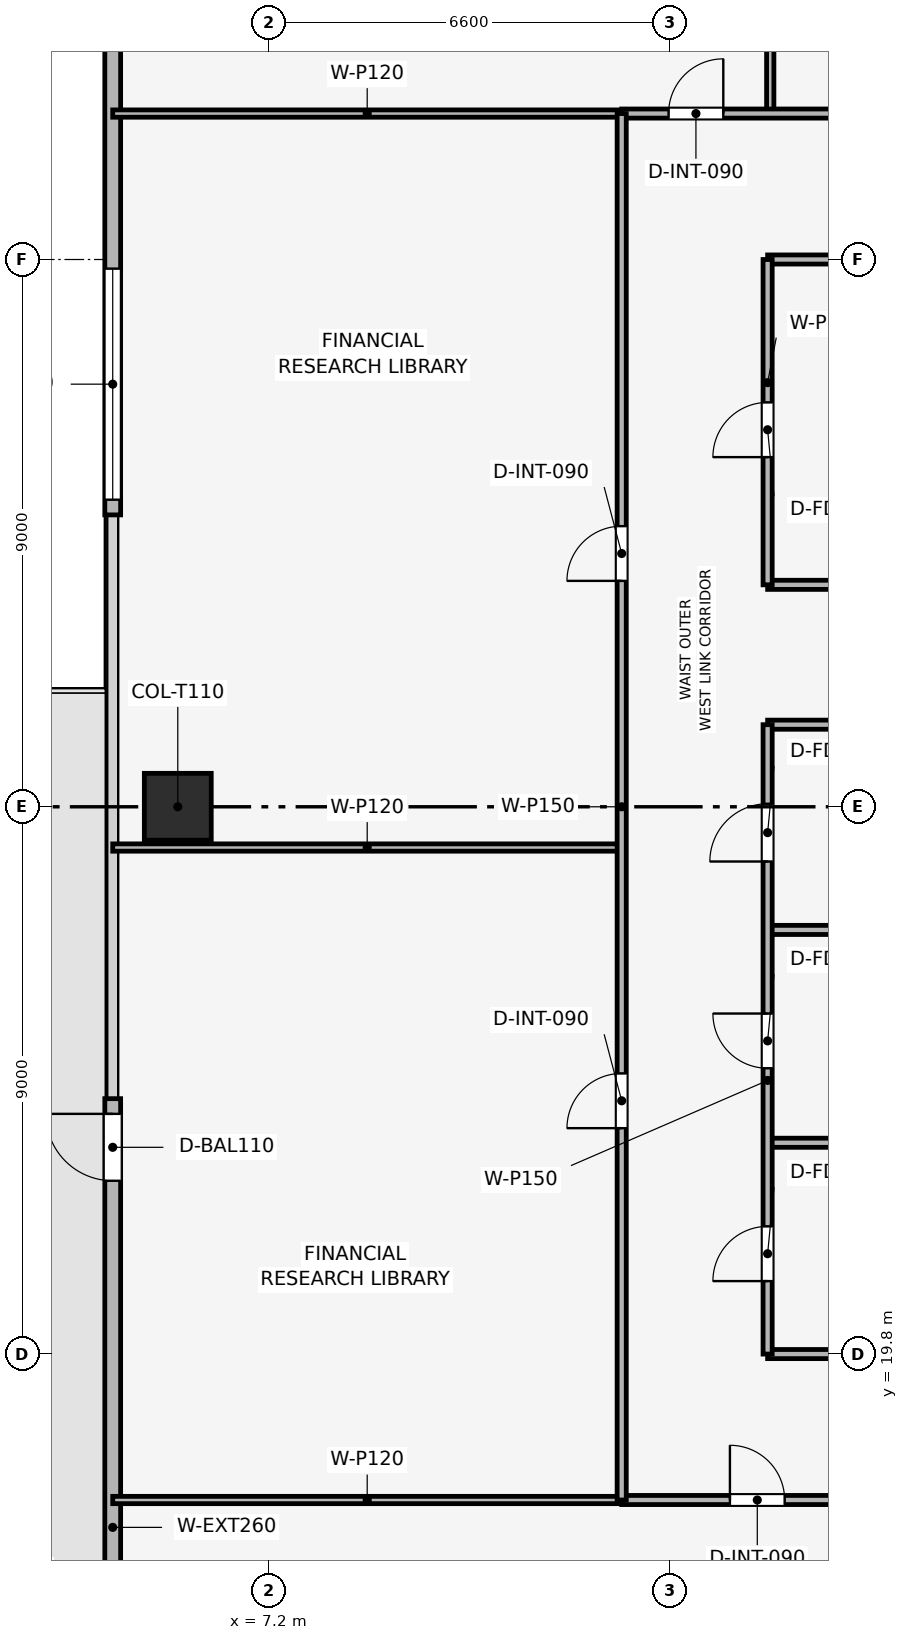
"""IFC4 building model, lengths in metres.
Left out: names, types, materials, properties, quantities, classifications, styles, units other than length and angle.
Written with IfcOpenShell. Run it as: python <this file> out.ifc"""

import sys

from ifc_helpers import new_model, si_unit, direction, frame, frame_2d, origin, origin_2d, place, context, subcontext, project, spatial, rectangle, extrude, element, fill, save


model = new_model("IFC4")
c1 = context("Model", 3, precision=1e-05, world=origin(), true_north=direction((0.0, 1.0)))
c2 = subcontext(c1, "Body", "Model", "MODEL_VIEW")
j1 = project(units=[si_unit("LENGTHUNIT", "METRE"), si_unit("PLANEANGLEUNIT", "RADIAN")], contexts=[c1])
p1 = place(None, origin())
s1 = spatial("IfcSite", under=j1, at=p1, CompositionType="ELEMENT")
p2 = place(p1, origin())
s2 = spatial("IfcBuilding", under=s1, at=p2, CompositionType="ELEMENT")
p3 = place(p2, frame((0.0, 0.0, 164.55)))
s3 = spatial("IfcBuildingStorey", under=s2, at=p3, CompositionType="ELEMENT", Elevation=164.55)
p4 = place(p3, frame((5.7, 28.8, 0.003), z_axis=(0.0, 0.0, 1.0), x_axis=(1.0, 0.0, 0.0)))
e1 = element("IfcColumn", 1, at=p4, inside=s3, PredefinedType="COLUMN", context=c2, shape_type="SweptSolid", body=[
    extrude(rectangle(XDim=1.1, YDim=1.1, at=origin_2d()), origin(), (0.0, 0.0, 1.0), 3.489),
])
p5 = place(p3, frame((4.63, 11.4, 0.0), z_axis=(0.0, 0.0, 1.0), x_axis=(0.0, 1.0, 0.0)))
e2 = element("IfcWall", 2, at=p5, inside=s3, PredefinedType="SOLIDWALL", context=c2, shape_type="SweptSolid", body=[
    extrude(rectangle(XDim=12.6, YDim=0.26, at=frame_2d((6.3, 0.0))), origin(), (0.0, 0.0, 1.0), 3.495),
])
p6 = place(p5, frame((11.25, 0.0, 0.0)))
e3 = element("IfcOpeningElement", 3, at=p6, cuts=e2, PredefinedType="OPENING", context=c2, shape_type="SweptSolid", body=[
    extrude(rectangle(XDim=1.1, YDim=2.2, at=frame_2d((0.55, 1.1))), frame((0.0, 0.14, 0.0), z_axis=(0.0, -1.0, 0.0), x_axis=(1.0, 0.0, 0.0)), (0.0, 0.0, 1.0), 0.28),
])
p7 = place(p3, frame((4.63, 33.6, 0.0), z_axis=(0.0, 0.0, 1.0), x_axis=(0.0, 1.0, 0.0)))
e4 = element("IfcWall", 4, at=p7, inside=s3, PredefinedType="SOLIDWALL", context=c2, shape_type="SweptSolid", body=[
    extrude(rectangle(XDim=12.6, YDim=0.26, at=frame_2d((6.3, 0.0))), origin(), (0.0, 0.0, 1.0), 3.495),
])
p8 = place(p7, frame((0.25, 0.0, 0.9)))
e5 = element("IfcOpeningElement", 5, at=p8, cuts=e4, PredefinedType="OPENING", context=c2, shape_type="SweptSolid", body=[
    extrude(rectangle(XDim=3.8, YDim=1.9, at=frame_2d((1.9, 0.95))), frame((0.0, 0.14, 0.0), z_axis=(0.0, -1.0, 0.0), x_axis=(1.0, 0.0, 0.0)), (0.0, 0.0, 1.0), 0.28),
])
p9 = place(p3, frame((15.4, 19.8, 0.0), z_axis=(0.0, 0.0, 1.0), x_axis=(1.0, 0.0, 0.0)))
e6 = element("IfcWall", 6, at=p9, inside=s3, PredefinedType="PARTITIONING", context=c2, shape_type="SweptSolid", body=[
    extrude(rectangle(XDim=4.4, YDim=0.15, at=frame_2d((2.2, 0.0))), origin(), (0.0, 0.0, 1.0), 3.03),
])
for number, where, z_axis, x_axis in (
    (7, (15.4, 23.275, 0.0), (0.0, 0.0, 1.0), (1.0, 0.0, 0.0)),
    (8, (15.4, 26.775, 0.0), (0.0, 0.0, 1.0), (1.0, 0.0, 0.0)),
    (9, (15.4, 30.15, 0.0), (0.0, 0.0, 1.0), (1.0, 0.0, 0.0)),
    (10, (15.4, 32.45, 0.0), (0.0, 0.0, 1.0), (1.0, 0.0, 0.0)),
):
    element("IfcWall", number, at=place(p3, frame(where, z_axis=z_axis, x_axis=x_axis)), inside=s3, PredefinedType="PARTITIONING", context=c2, shape_type="SweptSolid", body=[
        extrude(rectangle(XDim=4.4, YDim=0.15, at=frame_2d((2.2, 0.0))), origin(), (0.0, 0.0, 1.0), 3.495),
    ])
p10 = place(p3, frame((15.4, 37.8, 0.0), z_axis=(0.0, 0.0, 1.0), x_axis=(1.0, 0.0, 0.0)))
e11 = element("IfcWall", 11, at=p10, inside=s3, PredefinedType="PARTITIONING", context=c2, shape_type="SweptSolid", body=[
    extrude(rectangle(XDim=4.4, YDim=0.15, at=frame_2d((2.2, 0.0))), origin(), (0.0, 0.0, 1.0), 3.03),
])
p11 = place(p3, frame((15.4, 19.8, 0.0), z_axis=(0.0, 0.0, 1.0), x_axis=(0.0, 1.0, 0.0)))
e12 = element("IfcWall", 12, at=p11, inside=s3, PredefinedType="PARTITIONING", context=c2, shape_type="SweptSolid", body=[
    extrude(rectangle(XDim=10.35, YDim=0.15, at=frame_2d((5.175, 0.0))), origin(), (0.0, 0.0, 1.0), 3.03),
])
p12 = place(p11, frame((1.2, 0.0, 0.0)))
e13 = element("IfcOpeningElement", 13, at=p12, cuts=e12, PredefinedType="OPENING", context=c2, shape_type="SweptSolid", body=[
    extrude(rectangle(XDim=0.9, YDim=2.1, at=frame_2d((0.45, 1.05))), frame((0.0, 0.085, 0.0), z_axis=(0.0, -1.0, 0.0), x_axis=(1.0, 0.0, 0.0)), (0.0, 0.0, 1.0), 0.17),
])
p13 = place(p11, frame((4.7, 0.0, 0.0)))
e14 = element("IfcOpeningElement", 14, at=p13, cuts=e12, PredefinedType="OPENING", context=c2, shape_type="SweptSolid", body=[
    extrude(rectangle(XDim=0.9, YDim=2.1, at=frame_2d((0.45, 1.05))), frame((0.0, 0.085, 0.0), z_axis=(0.0, -1.0, 0.0), x_axis=(1.0, 0.0, 0.0)), (0.0, 0.0, 1.0), 0.17),
])
p14 = place(p11, frame((8.1, 0.0, 0.0)))
e15 = element("IfcOpeningElement", 15, at=p14, cuts=e12, PredefinedType="OPENING", context=c2, shape_type="SweptSolid", body=[
    extrude(rectangle(XDim=0.95, YDim=2.1, at=frame_2d((0.475, 1.05))), frame((0.0, 0.085, 0.0), z_axis=(0.0, -1.0, 0.0), x_axis=(1.0, 0.0, 0.0)), (0.0, 0.0, 1.0), 0.17),
])
p15 = place(p3, frame((15.4, 32.45, 0.0), z_axis=(0.0, 0.0, 1.0), x_axis=(0.0, 1.0, 0.0)))
e16 = element("IfcWall", 16, at=p15, inside=s3, PredefinedType="PARTITIONING", context=c2, shape_type="SweptSolid", body=[
    extrude(rectangle(XDim=5.35, YDim=0.15, at=frame_2d((2.675, 0.0))), origin(), (0.0, 0.0, 1.0), 3.03),
])
p16 = place(p15, frame((2.1, 0.0, 0.0)))
e17 = element("IfcOpeningElement", 17, at=p16, cuts=e16, PredefinedType="OPENING", context=c2, shape_type="SweptSolid", body=[
    extrude(rectangle(XDim=0.9, YDim=2.1, at=frame_2d((0.45, 1.05))), frame((0.0, 0.085, 0.0), z_axis=(0.0, -1.0, 0.0), x_axis=(1.0, 0.0, 0.0)), (0.0, 0.0, 1.0), 0.17),
])
p17 = place(p3, frame((15.443, 40.2, 0.0), z_axis=(0.0, 0.0, 1.0), x_axis=(0.0, 1.0, 0.0)))
e18 = element("IfcWall", 18, at=p17, inside=s3, PredefinedType="PARTITIONING", context=c2, shape_type="SweptSolid", body=[
    extrude(rectangle(XDim=12.77, YDim=0.12, at=frame_2d((6.385, 0.0))), origin(), (0.0, 0.0, 1.0), 2.98),
])
for number, where, z_axis, x_axis in (
    (19, (4.63, 28.13, 0.0), (0.0, 0.0, 1.0), (1.0, 0.0, 0.0)),
    (20, (4.63, 17.4, 0.0), (0.0, 0.0, 1.0), (1.0, 0.0, 0.0)),
    (21, (4.63, 40.2, 0.0), (0.0, 0.0, 1.0), (1.0, 0.0, 0.0)),
):
    element("IfcWall", number, at=place(p3, frame(where, z_axis=z_axis, x_axis=x_axis)), inside=s3, PredefinedType="PARTITIONING", context=c2, shape_type="SweptSolid", body=[
        extrude(rectangle(XDim=8.37, YDim=0.12, at=frame_2d((4.185, 0.0))), origin(), (0.0, 0.0, 1.0), 2.98),
    ])
p18 = place(p3, frame((13.0, 17.4, 0.0), z_axis=(0.0, 0.0, 1.0), x_axis=(1.0, 0.0, 0.0)))
e22 = element("IfcWall", 22, at=p18, inside=s3, PredefinedType="PARTITIONING", context=c2, shape_type="SweptSolid", body=[
    extrude(rectangle(XDim=31.6, YDim=0.15, at=frame_2d((15.8, 0.0))), origin(), (0.0, 0.0, 1.0), 3.03),
])
p19 = place(p18, frame((1.78, 0.0, 0.0)))
e23 = element("IfcOpeningElement", 23, at=p19, cuts=e22, PredefinedType="OPENING", context=c2, shape_type="SweptSolid", body=[
    extrude(rectangle(XDim=0.9, YDim=2.1, at=frame_2d((0.45, 1.05))), frame((0.0, 0.085, 0.0), z_axis=(0.0, -1.0, 0.0), x_axis=(1.0, 0.0, 0.0)), (0.0, 0.0, 1.0), 0.17),
])
p20 = place(p18, frame((17.58, 0.0, 0.0)))
e24 = element("IfcOpeningElement", 24, at=p20, cuts=e22, PredefinedType="OPENING", context=c2, shape_type="SweptSolid", body=[
    extrude(rectangle(XDim=0.9, YDim=2.1, at=frame_2d((0.45, 1.05))), frame((0.0, 0.085, 0.0), z_axis=(0.0, -1.0, 0.0), x_axis=(1.0, 0.0, 0.0)), (0.0, 0.0, 1.0), 0.17),
])
p21 = place(p3, frame((13.0, 40.2, 0.0), z_axis=(0.0, 0.0, 1.0), x_axis=(1.0, 0.0, 0.0)))
e25 = element("IfcWall", 25, at=p21, inside=s3, PredefinedType="PARTITIONING", context=c2, shape_type="SweptSolid", body=[
    extrude(rectangle(XDim=31.6, YDim=0.15, at=frame_2d((15.8, 0.0))), origin(), (0.0, 0.0, 1.0), 3.03),
])
p22 = place(p21, frame((0.771, 0.0, 0.0)))
e26 = element("IfcOpeningElement", 26, at=p22, cuts=e25, PredefinedType="OPENING", context=c2, shape_type="SweptSolid", body=[
    extrude(rectangle(XDim=0.9, YDim=2.1, at=frame_2d((0.45, 1.05))), frame((0.0, 0.085, 0.0), z_axis=(0.0, -1.0, 0.0), x_axis=(1.0, 0.0, 0.0)), (0.0, 0.0, 1.0), 0.17),
])
p23 = place(p21, frame((6.409, 0.0, 0.0)))
e27 = element("IfcOpeningElement", 27, at=p23, cuts=e25, PredefinedType="OPENING", context=c2, shape_type="SweptSolid", body=[
    extrude(rectangle(XDim=0.9, YDim=2.1, at=frame_2d((0.45, 1.05))), frame((0.0, 0.085, 0.0), z_axis=(0.0, -1.0, 0.0), x_axis=(1.0, 0.0, 0.0)), (0.0, 0.0, 1.0), 0.17),
])
p24 = place(p21, frame((15.239, 0.0, 0.0)))
e28 = element("IfcOpeningElement", 28, at=p24, cuts=e25, PredefinedType="OPENING", context=c2, shape_type="SweptSolid", body=[
    extrude(rectangle(XDim=0.9, YDim=2.1, at=frame_2d((0.45, 1.05))), frame((0.0, 0.085, 0.0), z_axis=(0.0, -1.0, 0.0), x_axis=(1.0, 0.0, 0.0)), (0.0, 0.0, 1.0), 0.17),
])
p25 = place(p21, frame((25.402, 0.0, 0.0)))
e29 = element("IfcOpeningElement", 29, at=p25, cuts=e25, PredefinedType="OPENING", context=c2, shape_type="SweptSolid", body=[
    extrude(rectangle(XDim=0.9, YDim=2.1, at=frame_2d((0.45, 1.05))), frame((0.0, 0.085, 0.0), z_axis=(0.0, -1.0, 0.0), x_axis=(1.0, 0.0, 0.0)), (0.0, 0.0, 1.0), 0.17),
])
p26 = place(p3, frame((13.0, 17.4, 0.0), z_axis=(0.0, 0.0, 1.0), x_axis=(0.0, 1.0, 0.0)))
e30 = element("IfcWall", 30, at=p26, inside=s3, PredefinedType="PARTITIONING", context=c2, shape_type="SweptSolid", body=[
    extrude(rectangle(XDim=22.8, YDim=0.15, at=frame_2d((11.4, 0.0))), origin(), (0.0, 0.0, 1.0), 3.03),
])
p27 = place(p26, frame((6.115, 0.0, 0.0)))
e31 = element("IfcOpeningElement", 31, at=p27, cuts=e30, PredefinedType="OPENING", context=c2, shape_type="SweptSolid", body=[
    extrude(rectangle(XDim=0.9, YDim=2.1, at=frame_2d((0.45, 1.05))), frame((0.0, 0.085, 0.0), z_axis=(0.0, -1.0, 0.0), x_axis=(1.0, 0.0, 0.0)), (0.0, 0.0, 1.0), 0.17),
])
p28 = place(p26, frame((15.115, 0.0, 0.0)))
e32 = element("IfcOpeningElement", 32, at=p28, cuts=e30, PredefinedType="OPENING", context=c2, shape_type="SweptSolid", body=[
    extrude(rectangle(XDim=0.9, YDim=2.1, at=frame_2d((0.45, 1.05))), frame((0.0, 0.085, 0.0), z_axis=(0.0, -1.0, 0.0), x_axis=(1.0, 0.0, 0.0)), (0.0, 0.0, 1.0), 0.17),
])
p29 = place(p6, origin())
e33 = element("IfcDoor", 33, at=p29, inside=s3, OperationType="SINGLE_SWING_RIGHT", PredefinedType="DOOR", context=c2, shape_type="SweptSolid", body=[
    extrude(rectangle(XDim=1.1, YDim=2.2, at=frame_2d((0.55, 1.1))), frame((0.0, 0.025, 0.0), z_axis=(0.0, -1.0, 0.0), x_axis=(1.0, 0.0, 0.0)), (0.0, 0.0, 1.0), 0.05),
])
fill(e3, e33)
p30 = place(p8, origin())
e34 = element("IfcWindow", 34, at=p30, inside=s3, PartitioningType="SINGLE_PANEL", PredefinedType="WINDOW", context=c2, shape_type="SweptSolid", body=[
    extrude(rectangle(XDim=3.8, YDim=1.9, at=frame_2d((1.9, 0.95))), frame((0.0, 0.03, 0.0), z_axis=(0.0, -1.0, 0.0), x_axis=(1.0, 0.0, 0.0)), (0.0, 0.0, 1.0), 0.06),
])
fill(e5, e34)
p31 = place(p12, origin())
e35 = element("IfcDoor", 35, at=p31, inside=s3, OperationType="SINGLE_SWING_LEFT", PredefinedType="DOOR", context=c2, shape_type="SweptSolid", body=[
    extrude(rectangle(XDim=0.9, YDim=2.1, at=frame_2d((0.45, 1.05))), frame((0.0, 0.025, 0.0), z_axis=(0.0, -1.0, 0.0), x_axis=(1.0, 0.0, 0.0)), (0.0, 0.0, 1.0), 0.05),
])
fill(e13, e35)
p32 = place(p13, origin())
e36 = element("IfcDoor", 36, at=p32, inside=s3, OperationType="SINGLE_SWING_RIGHT", PredefinedType="DOOR", context=c2, shape_type="SweptSolid", body=[
    extrude(rectangle(XDim=0.9, YDim=2.1, at=frame_2d((0.45, 1.05))), frame((0.0, 0.025, 0.0), z_axis=(0.0, -1.0, 0.0), x_axis=(1.0, 0.0, 0.0)), (0.0, 0.0, 1.0), 0.05),
])
fill(e14, e36)
p33 = place(p14, origin())
e37 = element("IfcDoor", 37, at=p33, inside=s3, OperationType="SINGLE_SWING_LEFT", PredefinedType="DOOR", context=c2, shape_type="SweptSolid", body=[
    extrude(rectangle(XDim=0.95, YDim=2.1, at=frame_2d((0.475, 1.05))), frame((0.0, 0.025, 0.0), z_axis=(0.0, -1.0, 0.0), x_axis=(1.0, 0.0, 0.0)), (0.0, 0.0, 1.0), 0.05),
])
fill(e15, e37)
p34 = place(p16, origin())
e38 = element("IfcDoor", 38, at=p34, inside=s3, OperationType="SINGLE_SWING_LEFT", PredefinedType="DOOR", context=c2, shape_type="SweptSolid", body=[
    extrude(rectangle(XDim=0.9, YDim=2.1, at=frame_2d((0.45, 1.05))), frame((0.0, 0.025, 0.0), z_axis=(0.0, -1.0, 0.0), x_axis=(1.0, 0.0, 0.0)), (0.0, 0.0, 1.0), 0.05),
])
fill(e17, e38)
p35 = place(p19, origin())
e39 = element("IfcDoor", 39, at=p35, inside=s3, OperationType="SINGLE_SWING_LEFT", PredefinedType="DOOR", context=c2, shape_type="SweptSolid", body=[
    extrude(rectangle(XDim=0.9, YDim=2.1, at=frame_2d((0.45, 1.05))), frame((0.0, 0.025, 0.0), z_axis=(0.0, -1.0, 0.0), x_axis=(1.0, 0.0, 0.0)), (0.0, 0.0, 1.0), 0.05),
])
fill(e23, e39)
p36 = place(p22, origin())
e40 = element("IfcDoor", 40, at=p36, inside=s3, OperationType="SINGLE_SWING_RIGHT", PredefinedType="DOOR", context=c2, shape_type="SweptSolid", body=[
    extrude(rectangle(XDim=0.9, YDim=2.1, at=frame_2d((0.45, 1.05))), frame((0.0, 0.025, 0.0), z_axis=(0.0, -1.0, 0.0), x_axis=(1.0, 0.0, 0.0)), (0.0, 0.0, 1.0), 0.05),
])
fill(e26, e40)
p37 = place(p27, origin())
e41 = element("IfcDoor", 41, at=p37, inside=s3, OperationType="SINGLE_SWING_LEFT", PredefinedType="DOOR", context=c2, shape_type="SweptSolid", body=[
    extrude(rectangle(XDim=0.9, YDim=2.1, at=frame_2d((0.45, 1.05))), frame((0.0, 0.025, 0.0), z_axis=(0.0, -1.0, 0.0), x_axis=(1.0, 0.0, 0.0)), (0.0, 0.0, 1.0), 0.05),
])
fill(e31, e41)
p38 = place(p28, origin())
e42 = element("IfcDoor", 42, at=p38, inside=s3, OperationType="SINGLE_SWING_LEFT", PredefinedType="DOOR", context=c2, shape_type="SweptSolid", body=[
    extrude(rectangle(XDim=0.9, YDim=2.1, at=frame_2d((0.45, 1.05))), frame((0.0, 0.025, 0.0), z_axis=(0.0, -1.0, 0.0), x_axis=(1.0, 0.0, 0.0)), (0.0, 0.0, 1.0), 0.05),
])
fill(e32, e42)
save(model, sys.argv[1])
